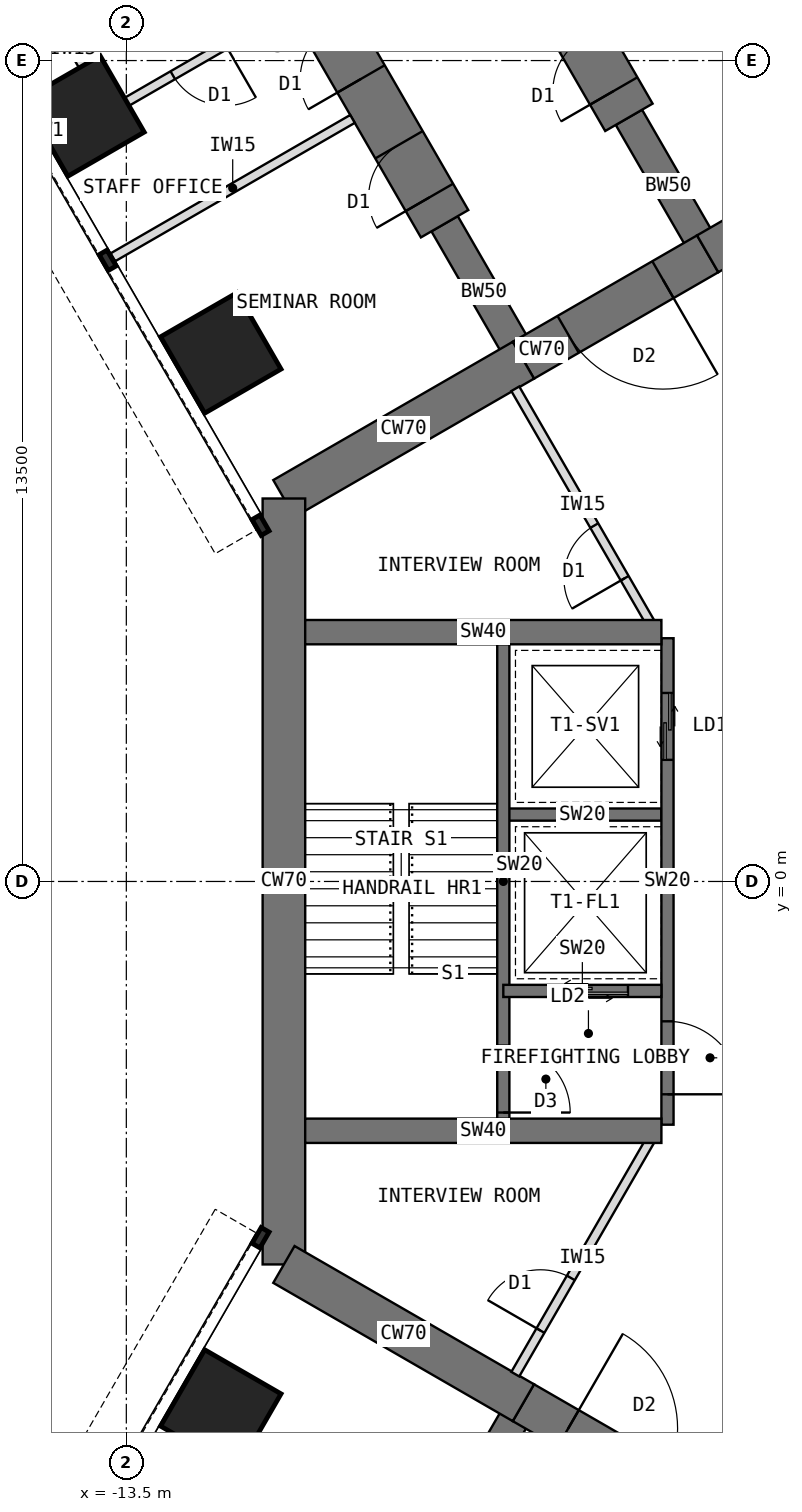
"""IFC4 building model, lengths in metres.
Left out: names, types, materials, properties, quantities, classifications, styles, units other than length and angle.
Written with IfcOpenShell. Run it as: python <this file> out.ifc"""

import sys

from ifc_helpers import new_model, si_unit, direction, frame, frame_2d, origin, origin_2d, place, context, subcontext, project, spatial, rectangle, extrude, element, fill, save


model = new_model("IFC4")
c1 = context("Model", 3, precision=1e-05, world=origin(), true_north=direction((0.0, 1.0)))
c2 = subcontext(c1, "Body", "Model", "MODEL_VIEW")
j1 = project(units=[si_unit("LENGTHUNIT", "METRE"), si_unit("PLANEANGLEUNIT", "RADIAN")], contexts=[c1])
p1 = place(None, origin())
s1 = spatial("IfcSite", under=j1, at=p1, CompositionType="ELEMENT")
p2 = place(p1, origin())
s2 = spatial("IfcBuilding", under=s1, at=p2, CompositionType="ELEMENT")
p3 = place(p2, frame((0.0, 0.0, 68.5)))
s3 = spatial("IfcBuildingStorey", under=s2, at=p3, CompositionType="ELEMENT", Elevation=68.5)
p4 = place(p3, frame((0.0, 12.596, 0.0), z_axis=(0.0, 0.0, 1.0), x_axis=(-0.866011268655, -0.500024481964, 0.0)))
e1 = element("IfcWall", 1, at=p4, inside=s3, PredefinedType="SHEAR", context=c2, shape_type="SweptSolid", body=[
    extrude(rectangle(XDim=4.548, YDim=0.7, at=frame_2d((2.274, 0.0))), origin(), (0.0, 0.0, 1.0), 4.0),
])
p5 = place(p3, frame((-3.939, 10.322, 0.0), z_axis=(0.0, 0.0, 1.0), x_axis=(-0.866019471182, -0.500010275428, 0.0)))
e2 = element("IfcWall", 2, at=p5, inside=s3, PredefinedType="SHEAR", context=c2, shape_type="SweptSolid", body=[
    extrude(rectangle(XDim=3.5, YDim=0.7, at=frame_2d((1.75, 0.0))), origin(), (0.0, 0.0, 1.0), 4.0),
])
p6 = place(p5, frame((0.85, 0.0, 0.0)))
e3 = element("IfcOpeningElement", 3, at=p6, cuts=e2, PredefinedType="OPENING", context=c2, shape_type="SweptSolid", body=[
    extrude(rectangle(XDim=1.8, YDim=2.1, at=frame_2d((0.9, 1.05))), frame((0.0, 0.36, 0.0), z_axis=(0.0, -1.0, 0.0), x_axis=(1.0, 0.0, 0.0)), (0.0, 0.0, 1.0), 0.72),
])
p7 = place(p3, frame((-6.97, 8.572, 0.0), z_axis=(0.0, 0.0, 1.0), x_axis=(-0.866034513004, -0.499984222037, 0.0)))
e4 = element("IfcWall", 4, at=p7, inside=s3, PredefinedType="SHEAR", context=c2, shape_type="SweptSolid", body=[
    extrude(rectangle(XDim=4.548, YDim=0.7, at=frame_2d((2.274, 0.0))), origin(), (0.0, 0.0, 1.0), 4.0),
])
p8 = place(p3, frame((-10.908, 6.298, 0.0), z_axis=(0.0, 0.0, 1.0), x_axis=(0.0, -1.0, 0.0)))
e5 = element("IfcWall", 5, at=p8, inside=s3, PredefinedType="SHEAR", context=c2, shape_type="SweptSolid", body=[
    extrude(rectangle(XDim=12.596, YDim=0.7, at=frame_2d((6.298, 0.0))), origin(), (0.0, 0.0, 1.0), 4.0),
])
p9 = place(p3, frame((-10.908, -6.298, 0.0), z_axis=(0.0, 0.0, 1.0), x_axis=(0.866034513004, -0.499984222037, 0.0)))
e6 = element("IfcWall", 6, at=p9, inside=s3, PredefinedType="SHEAR", context=c2, shape_type="SweptSolid", body=[
    extrude(rectangle(XDim=4.548, YDim=0.7, at=frame_2d((2.274, 0.0))), origin(), (0.0, 0.0, 1.0), 4.0),
])
p10 = place(p3, frame((-6.97, -8.572, 0.0), z_axis=(0.0, 0.0, 1.0), x_axis=(0.866019471182, -0.500010275428, 0.0)))
e7 = element("IfcWall", 7, at=p10, inside=s3, PredefinedType="SHEAR", context=c2, shape_type="SweptSolid", body=[
    extrude(rectangle(XDim=3.5, YDim=0.7, at=frame_2d((1.75, 0.0))), origin(), (0.0, 0.0, 1.0), 4.0),
])
p11 = place(p10, frame((0.85, 0.0, 0.0)))
e8 = element("IfcOpeningElement", 8, at=p11, cuts=e7, PredefinedType="OPENING", context=c2, shape_type="SweptSolid", body=[
    extrude(rectangle(XDim=1.8, YDim=2.1, at=frame_2d((0.9, 1.05))), frame((0.0, 0.36, 0.0), z_axis=(0.0, -1.0, 0.0), x_axis=(1.0, 0.0, 0.0)), (0.0, 0.0, 1.0), 0.72),
])
p12 = place(p3, frame((-6.97, 8.572, 0.0), z_axis=(0.0, 0.0, 1.0), x_axis=(-0.499988811324, 0.866031863473, 0.0)))
e9 = element("IfcWall", 9, at=p12, inside=s3, PredefinedType="SHEAR", context=c2, shape_type="SweptSolid", body=[
    extrude(rectangle(XDim=2.592, YDim=0.5, at=frame_2d((1.296, 0.0))), origin(), (0.0, 0.0, 1.0), 4.0),
])
p13 = place(p3, frame((-8.266, 10.816, 0.0), z_axis=(0.0, 0.0, 1.0), x_axis=(-0.499996231654, 0.866027579429, 0.0)))
e10 = element("IfcWall", 10, at=p13, inside=s3, PredefinedType="SHEAR", context=c2, shape_type="SweptSolid", body=[
    extrude(rectangle(XDim=13.2, YDim=0.9, at=frame_2d((6.6, 0.0))), origin(), (0.0, 0.0, 1.0), 4.0),
])
p14 = place(p13, frame((0.5, 0.0, 0.0)))
e11 = element("IfcOpeningElement", 11, at=p14, cuts=e10, PredefinedType="OPENING", context=c2, shape_type="SweptSolid", body=[
    extrude(rectangle(XDim=1.0, YDim=2.1, at=frame_2d((0.5, 1.05))), frame((0.0, 0.46, 0.0), z_axis=(0.0, -1.0, 0.0), x_axis=(1.0, 0.0, 0.0)), (0.0, 0.0, 1.0), 0.92),
])
p15 = place(p13, frame((2.75, 0.0, 0.0)))
e12 = element("IfcOpeningElement", 12, at=p15, cuts=e10, PredefinedType="OPENING", context=c2, shape_type="SweptSolid", body=[
    extrude(rectangle(XDim=1.0, YDim=2.1, at=frame_2d((0.5, 1.05))), frame((0.0, 0.46, 0.0), z_axis=(0.0, -1.0, 0.0), x_axis=(1.0, 0.0, 0.0)), (0.0, 0.0, 1.0), 0.92),
])
p16 = place(p13, frame((7.25, 0.0, 0.0)))
e13 = element("IfcOpeningElement", 13, at=p16, cuts=e10, PredefinedType="OPENING", context=c2, shape_type="SweptSolid", body=[
    extrude(rectangle(XDim=1.0, YDim=2.1, at=frame_2d((0.5, 1.05))), frame((0.0, 0.46, 0.0), z_axis=(0.0, -1.0, 0.0), x_axis=(1.0, 0.0, 0.0)), (0.0, 0.0, 1.0), 0.92),
])
p17 = place(p3, frame((-3.939, 10.322, 0.0), z_axis=(0.0, 0.0, 1.0), x_axis=(-0.499918158782, 0.866072649678, 0.0)))
e14 = element("IfcWall", 14, at=p17, inside=s3, PredefinedType="SHEAR", context=c2, shape_type="SweptSolid", body=[
    extrude(rectangle(XDim=2.592, YDim=0.5, at=frame_2d((1.296, 0.0))), origin(), (0.0, 0.0, 1.0), 4.0),
])
p18 = place(p3, frame((-5.234, 12.566, 0.0), z_axis=(0.0, 0.0, 1.0), x_axis=(-0.500010103361, 0.866019570528, 0.0)))
e15 = element("IfcWall", 15, at=p18, inside=s3, PredefinedType="SHEAR", context=c2, shape_type="SweptSolid", body=[
    extrude(rectangle(XDim=13.2, YDim=0.9, at=frame_2d((6.6, 0.0))), origin(), (0.0, 0.0, 1.0), 4.0),
])
p19 = place(p18, frame((0.5, 0.0, 0.0)))
e16 = element("IfcOpeningElement", 16, at=p19, cuts=e15, PredefinedType="OPENING", context=c2, shape_type="SweptSolid", body=[
    extrude(rectangle(XDim=1.0, YDim=2.1, at=frame_2d((0.5, 1.05))), frame((0.0, 0.46, 0.0), z_axis=(0.0, -1.0, 0.0), x_axis=(1.0, 0.0, 0.0)), (0.0, 0.0, 1.0), 0.92),
])
p20 = place(p18, frame((2.75, 0.0, 0.0)))
e17 = element("IfcOpeningElement", 17, at=p20, cuts=e15, PredefinedType="OPENING", context=c2, shape_type="SweptSolid", body=[
    extrude(rectangle(XDim=1.0, YDim=2.1, at=frame_2d((0.5, 1.05))), frame((0.0, 0.46, 0.0), z_axis=(0.0, -1.0, 0.0), x_axis=(1.0, 0.0, 0.0)), (0.0, 0.0, 1.0), 0.92),
])
p21 = place(p18, frame((7.25, 0.0, 0.0)))
e18 = element("IfcOpeningElement", 18, at=p21, cuts=e15, PredefinedType="OPENING", context=c2, shape_type="SweptSolid", body=[
    extrude(rectangle(XDim=1.0, YDim=2.1, at=frame_2d((0.5, 1.05))), frame((0.0, 0.46, 0.0), z_axis=(0.0, -1.0, 0.0), x_axis=(1.0, 0.0, 0.0)), (0.0, 0.0, 1.0), 0.92),
])
p22 = place(p3, frame((-6.97, -8.572, 0.0), z_axis=(0.0, 0.0, 1.0), x_axis=(-0.499988811324, -0.866031863473, 0.0)))
e19 = element("IfcWall", 19, at=p22, inside=s3, PredefinedType="SHEAR", context=c2, shape_type="SweptSolid", body=[
    extrude(rectangle(XDim=2.592, YDim=0.5, at=frame_2d((1.296, 0.0))), origin(), (0.0, 0.0, 1.0), 4.0),
])
for number, where, z_axis, x_axis in (
    (20, (-11.946, 8.691, 0.0), (0.0, 0.0, 1.0), (0.866, 0.5, 0.0)),
    (21, (-14.196, 12.588, 0.0), (0.0, 0.0, 1.0), (0.866, 0.5, 0.0)),
    (22, (-11.946, -8.691, 0.0), (0.0, 0.0, 1.0), (0.5, 0.866, 0.0)),
):
    element("IfcColumn", number, at=place(p3, frame(where, z_axis=z_axis, x_axis=x_axis)), inside=s3, PredefinedType="COLUMN", context=c2, shape_type="SweptSolid", body=[
        extrude(rectangle(XDim=1.45, YDim=1.45, at=origin_2d()), origin(), (0.0, 0.0, 1.0), 4.0),
    ])
p23 = place(p3, frame((-4.6, 4.0, 0.0), z_axis=(0.0, 0.0, 1.0), x_axis=(0.0, -1.0, 0.0)))
e23 = element("IfcWall", 23, at=p23, inside=s3, PredefinedType="SHEAR", context=c2, shape_type="SweptSolid", body=[
    extrude(rectangle(XDim=8.0, YDim=0.2, at=frame_2d((4.0, 0.0))), origin(), (0.0, 0.0, 1.0), 4.0),
])
p24 = place(p23, frame((6.3, 0.0, 0.0)))
e24 = element("IfcOpeningElement", 24, at=p24, cuts=e23, PredefinedType="OPENING", context=c2, shape_type="SweptSolid", body=[
    extrude(rectangle(XDim=1.2, YDim=2.1, at=frame_2d((0.6, 1.05))), frame((0.0, 0.11, 0.0), z_axis=(0.0, -1.0, 0.0), x_axis=(1.0, 0.0, 0.0)), (0.0, 0.0, 1.0), 0.22),
])
p25 = place(p23, frame((0.9, 0.0, 0.0)))
e25 = element("IfcOpeningElement", 25, at=p25, cuts=e23, PredefinedType="OPENING", context=c2, shape_type="SweptSolid", body=[
    extrude(rectangle(XDim=1.1, YDim=2.2, at=frame_2d((0.55, 1.1))), frame((0.0, 0.11, 0.0), z_axis=(0.0, -1.0, 0.0), x_axis=(1.0, 0.0, 0.0)), (0.0, 0.0, 1.0), 0.22),
])
p26 = place(p3, frame((-4.7, 1.1, 0.0), z_axis=(0.0, 0.0, 1.0), x_axis=(-1.0, 0.0, 0.0)))
e26 = element("IfcWall", 26, at=p26, inside=s3, PredefinedType="SHEAR", context=c2, shape_type="SweptSolid", body=[
    extrude(rectangle(XDim=2.6, YDim=0.2, at=frame_2d((1.3, 0.0))), origin(), (0.0, 0.0, 1.0), 4.0),
])
p27 = place(p3, frame((-4.7, -1.8, 0.0), z_axis=(0.0, 0.0, 1.0), x_axis=(-1.0, 0.0, 0.0)))
e27 = element("IfcWall", 27, at=p27, inside=s3, PredefinedType="SHEAR", context=c2, shape_type="SweptSolid", body=[
    extrude(rectangle(XDim=2.6, YDim=0.2, at=frame_2d((1.3, 0.0))), origin(), (0.0, 0.0, 1.0), 4.0),
])
p28 = place(p27, frame((0.55, 0.0, 0.0)))
e28 = element("IfcOpeningElement", 28, at=p28, cuts=e27, PredefinedType="OPENING", context=c2, shape_type="SweptSolid", body=[
    extrude(rectangle(XDim=1.3, YDim=2.2, at=frame_2d((0.65, 1.1))), frame((0.0, 0.11, 0.0), z_axis=(0.0, -1.0, 0.0), x_axis=(1.0, 0.0, 0.0)), (0.0, 0.0, 1.0), 0.22),
])
p29 = place(p3, frame((-7.3, 4.0, 0.0), z_axis=(0.0, 0.0, 1.0), x_axis=(0.0, -1.0, 0.0)))
e29 = element("IfcWall", 29, at=p29, inside=s3, PredefinedType="SHEAR", context=c2, shape_type="SweptSolid", body=[
    extrude(rectangle(XDim=8.0, YDim=0.2, at=frame_2d((4.0, 0.0))), origin(), (0.0, 0.0, 1.0), 4.0),
])
p30 = place(p29, frame((6.7, 0.0, 0.0)))
e30 = element("IfcOpeningElement", 30, at=p30, cuts=e29, PredefinedType="OPENING", context=c2, shape_type="SweptSolid", body=[
    extrude(rectangle(XDim=1.1, YDim=2.1, at=frame_2d((0.55, 1.05))), frame((0.0, 0.11, 0.0), z_axis=(0.0, -1.0, 0.0), x_axis=(1.0, 0.0, 0.0)), (0.0, 0.0, 1.0), 0.22),
])
for number, where, z_axis, x_axis in (
    (31, (-4.7, -4.1, 0.0), (0.0, 0.0, 1.0), (-1.0, 0.0, 0.0)),
    (32, (-4.7, 4.1, 0.0), (0.0, 0.0, 1.0), (-1.0, 0.0, 0.0)),
):
    element("IfcWall", number, at=place(p3, frame(where, z_axis=z_axis, x_axis=x_axis)), inside=s3, PredefinedType="SHEAR", context=c2, shape_type="SweptSolid", body=[
        extrude(rectangle(XDim=5.858, YDim=0.4, at=frame_2d((2.929, 0.0))), origin(), (0.0, 0.0, 1.0), 4.0),
    ])
p31 = place(p3, frame((-9.78, 12.54, 0.0), z_axis=(0.0, 0.0, 1.0), x_axis=(-0.866035472144, -0.499982560684, 0.0)))
e33 = element("IfcWall", 33, at=p31, inside=s3, PredefinedType="PARTITIONING", context=c2, shape_type="SweptSolid", body=[
    extrude(rectangle(XDim=4.55, YDim=0.15, at=frame_2d((2.275, 0.0))), origin(), (0.0, 0.0, 1.0), 3.8),
])
p32 = place(p3, frame((-13.775, 12.658, 0.0), z_axis=(0.0, 0.0, 1.0), x_axis=(-0.500033551112, 0.866006032174, 0.0)))
e34 = element("IfcWall", 34, at=p32, inside=s3, PredefinedType="PARTITIONING", context=c2, shape_type="SweptSolid", body=[
    extrude(rectangle(XDim=2.4, YDim=0.15, at=frame_2d((1.2, 0.0))), origin(), (0.0, 0.0, 1.0), 3.8),
])
p33 = place(p3, frame((-10.83, 14.359, 0.0), z_axis=(0.0, 0.0, 1.0), x_axis=(-0.865989465428, -0.500062241894, 0.0)))
e35 = element("IfcWall", 35, at=p33, inside=s3, PredefinedType="PARTITIONING", context=c2, shape_type="SweptSolid", body=[
    extrude(rectangle(XDim=3.4, YDim=0.15, at=frame_2d((1.7, 0.0))), origin(), (0.0, 0.0, 1.0), 3.8),
])
p34 = place(p33, frame((1.2, 0.0, 0.0)))
e36 = element("IfcOpeningElement", 36, at=p34, cuts=e35, PredefinedType="OPENING", context=c2, shape_type="SweptSolid", body=[
    extrude(rectangle(XDim=1.0, YDim=2.1, at=frame_2d((0.5, 1.05))), frame((0.0, 0.085, 0.0), z_axis=(0.0, -1.0, 0.0), x_axis=(1.0, 0.0, 0.0)), (0.0, 0.0, 1.0), 0.17),
])
p35 = place(p3, frame((-7.103, -8.103, 0.0), z_axis=(0.0, 0.0, 1.0), x_axis=(0.500007369519, 0.866021148949, 0.0)))
e37 = element("IfcWall", 37, at=p35, inside=s3, PredefinedType="PARTITIONING", context=c2, shape_type="SweptSolid", body=[
    extrude(rectangle(XDim=4.426, YDim=0.15, at=frame_2d((2.213, 0.0))), origin(), (0.0, 0.0, 1.0), 3.8),
])
p36 = place(p35, frame((0.828, 0.0, 0.0)))
e38 = element("IfcOpeningElement", 38, at=p36, cuts=e37, PredefinedType="OPENING", context=c2, shape_type="SweptSolid", body=[
    extrude(rectangle(XDim=1.0, YDim=2.1, at=frame_2d((0.5, 1.05))), frame((0.0, 0.085, 0.0), z_axis=(0.0, -1.0, 0.0), x_axis=(1.0, 0.0, 0.0)), (0.0, 0.0, 1.0), 0.17),
])
p37 = place(p3, frame((-4.89, 4.27, 0.0), z_axis=(0.0, 0.0, 1.0), x_axis=(-0.500007369519, 0.866021148949, 0.0)))
e39 = element("IfcWall", 39, at=p37, inside=s3, PredefinedType="PARTITIONING", context=c2, shape_type="SweptSolid", body=[
    extrude(rectangle(XDim=4.426, YDim=0.15, at=frame_2d((2.213, 0.0))), origin(), (0.0, 0.0, 1.0), 3.8),
])
p38 = place(p37, frame((0.828, 0.0, 0.0)))
e40 = element("IfcOpeningElement", 40, at=p38, cuts=e39, PredefinedType="OPENING", context=c2, shape_type="SweptSolid", body=[
    extrude(rectangle(XDim=1.0, YDim=2.1, at=frame_2d((0.5, 1.05))), frame((0.0, 0.085, 0.0), z_axis=(0.0, -1.0, 0.0), x_axis=(1.0, 0.0, 0.0)), (0.0, 0.0, 1.0), 0.17),
])
p39 = place(p24, origin())
e41 = element("IfcDoor", 41, at=p39, inside=s3, OperationType="SINGLE_SWING_RIGHT", PredefinedType="DOOR", context=c2, shape_type="SweptSolid", body=[
    extrude(rectangle(XDim=1.2, YDim=2.1, at=frame_2d((0.6, 1.05))), frame((0.0, 0.025, 0.0), z_axis=(0.0, -1.0, 0.0), x_axis=(1.0, 0.0, 0.0)), (0.0, 0.0, 1.0), 0.05),
])
fill(e24, e41)
p40 = place(p28, origin())
e42 = element("IfcDoor", 42, at=p40, inside=s3, OperationType="DOUBLE_DOOR_SLIDING", PredefinedType="DOOR", context=c2, shape_type="SweptSolid", body=[
    extrude(rectangle(XDim=1.3, YDim=2.2, at=frame_2d((0.65, 1.1))), frame((0.0, 0.025, 0.0), z_axis=(0.0, -1.0, 0.0), x_axis=(1.0, 0.0, 0.0)), (0.0, 0.0, 1.0), 0.05),
])
fill(e28, e42)
p41 = place(p25, origin())
e43 = element("IfcDoor", 43, at=p41, inside=s3, OperationType="DOUBLE_DOOR_SLIDING", PredefinedType="DOOR", context=c2, shape_type="SweptSolid", body=[
    extrude(rectangle(XDim=1.1, YDim=2.2, at=frame_2d((0.55, 1.1))), frame((0.0, 0.025, 0.0), z_axis=(0.0, -1.0, 0.0), x_axis=(1.0, 0.0, 0.0)), (0.0, 0.0, 1.0), 0.05),
])
fill(e25, e43)
p42 = place(p30, origin())
e44 = element("IfcDoor", 44, at=p42, inside=s3, OperationType="SINGLE_SWING_RIGHT", PredefinedType="DOOR", context=c2, shape_type="SweptSolid", body=[
    extrude(rectangle(XDim=1.1, YDim=2.1, at=frame_2d((0.55, 1.05))), frame((0.0, 0.025, 0.0), z_axis=(0.0, -1.0, 0.0), x_axis=(1.0, 0.0, 0.0)), (0.0, 0.0, 1.0), 0.05),
])
fill(e30, e44)
p43 = place(p6, origin())
e45 = element("IfcDoor", 45, at=p43, inside=s3, OperationType="DOUBLE_DOOR_DOUBLE_SWING", PredefinedType="DOOR", context=c2, shape_type="SweptSolid", body=[
    extrude(rectangle(XDim=1.72, YDim=2.06, at=frame_2d((0.9, 1.03))), frame((0.0, 0.025, 0.0), z_axis=(0.0, -1.0, 0.0), x_axis=(1.0, 0.0, 0.0)), (0.0, 0.0, 1.0), 0.05),
    extrude(rectangle(XDim=0.04, YDim=2.1, at=frame_2d((0.02, 1.05))), frame((0.0, 0.35, 0.0), z_axis=(0.0, -1.0, 0.0), x_axis=(1.0, 0.0, 0.0)), (0.0, 0.0, 1.0), 0.699),
    extrude(rectangle(XDim=0.04, YDim=2.1, at=frame_2d((1.78, 1.05))), frame((0.0, 0.35, 0.0), z_axis=(0.0, -1.0, 0.0), x_axis=(1.0, 0.0, 0.0)), (0.0, 0.0, 1.0), 0.699),
    extrude(rectangle(XDim=1.72, YDim=0.04, at=frame_2d((0.9, 2.08))), frame((0.0, 0.35, 0.0), z_axis=(0.0, -1.0, 0.0), x_axis=(1.0, 0.0, 0.0)), (0.0, 0.0, 1.0), 0.699),
])
fill(e3, e45)
p44 = place(p11, origin())
e46 = element("IfcDoor", 46, at=p44, inside=s3, OperationType="DOUBLE_DOOR_DOUBLE_SWING", PredefinedType="DOOR", context=c2, shape_type="SweptSolid", body=[
    extrude(rectangle(XDim=1.72, YDim=2.06, at=frame_2d((0.9, 1.03))), frame((0.0, 0.025, 0.0), z_axis=(0.0, -1.0, 0.0), x_axis=(1.0, 0.0, 0.0)), (0.0, 0.0, 1.0), 0.05),
    extrude(rectangle(XDim=0.04, YDim=2.1, at=frame_2d((0.02, 1.05))), frame((0.0, 0.35, 0.0), z_axis=(0.0, -1.0, 0.0), x_axis=(1.0, 0.0, 0.0)), (0.0, 0.0, 1.0), 0.699),
    extrude(rectangle(XDim=0.04, YDim=2.1, at=frame_2d((1.78, 1.05))), frame((0.0, 0.35, 0.0), z_axis=(0.0, -1.0, 0.0), x_axis=(1.0, 0.0, 0.0)), (0.0, 0.0, 1.0), 0.699),
    extrude(rectangle(XDim=1.72, YDim=0.04, at=frame_2d((0.9, 2.08))), frame((0.0, 0.35, 0.0), z_axis=(0.0, -1.0, 0.0), x_axis=(1.0, 0.0, 0.0)), (0.0, 0.0, 1.0), 0.699),
])
fill(e8, e46)
p45 = place(p34, origin())
e47 = element("IfcDoor", 47, at=p45, inside=s3, OperationType="SINGLE_SWING_LEFT", PredefinedType="DOOR", context=c2, shape_type="SweptSolid", body=[
    extrude(rectangle(XDim=1.0, YDim=2.1, at=frame_2d((0.5, 1.05))), frame((0.0, 0.025, 0.0), z_axis=(0.0, -1.0, 0.0), x_axis=(1.0, 0.0, 0.0)), (0.0, 0.0, 1.0), 0.05),
])
fill(e36, e47)
p46 = place(p36, origin())
e48 = element("IfcDoor", 48, at=p46, inside=s3, OperationType="SINGLE_SWING_LEFT", PredefinedType="DOOR", context=c2, shape_type="SweptSolid", body=[
    extrude(rectangle(XDim=1.0, YDim=2.1, at=frame_2d((0.5, 1.05))), frame((0.0, 0.025, 0.0), z_axis=(0.0, -1.0, 0.0), x_axis=(1.0, 0.0, 0.0)), (0.0, 0.0, 1.0), 0.05),
])
fill(e38, e48)
p47 = place(p38, origin())
e49 = element("IfcDoor", 49, at=p47, inside=s3, OperationType="SINGLE_SWING_LEFT", PredefinedType="DOOR", context=c2, shape_type="SweptSolid", body=[
    extrude(rectangle(XDim=1.0, YDim=2.1, at=frame_2d((0.5, 1.05))), frame((0.0, 0.025, 0.0), z_axis=(0.0, -1.0, 0.0), x_axis=(1.0, 0.0, 0.0)), (0.0, 0.0, 1.0), 0.05),
])
fill(e40, e49)
p48 = place(p14, origin())
e50 = element("IfcDoor", 50, at=p48, inside=s3, OperationType="SINGLE_SWING_LEFT", PredefinedType="DOOR", context=c2, shape_type="SweptSolid", body=[
    extrude(rectangle(XDim=0.92, YDim=2.06, at=frame_2d((0.5, 1.03))), frame((0.0, 0.025, 0.0), z_axis=(0.0, -1.0, 0.0), x_axis=(1.0, 0.0, 0.0)), (0.0, 0.0, 1.0), 0.05),
    extrude(rectangle(XDim=0.04, YDim=2.1, at=frame_2d((0.02, 1.05))), frame((0.0, 0.45, 0.0), z_axis=(0.0, -1.0, 0.0), x_axis=(1.0, 0.0, 0.0)), (0.0, 0.0, 1.0), 0.899),
    extrude(rectangle(XDim=0.04, YDim=2.1, at=frame_2d((0.98, 1.05))), frame((0.0, 0.45, 0.0), z_axis=(0.0, -1.0, 0.0), x_axis=(1.0, 0.0, 0.0)), (0.0, 0.0, 1.0), 0.899),
    extrude(rectangle(XDim=0.92, YDim=0.04, at=frame_2d((0.5, 2.08))), frame((0.0, 0.45, 0.0), z_axis=(0.0, -1.0, 0.0), x_axis=(1.0, 0.0, 0.0)), (0.0, 0.0, 1.0), 0.899),
])
fill(e11, e50)
p49 = place(p15, origin())
e51 = element("IfcDoor", 51, at=p49, inside=s3, OperationType="SINGLE_SWING_LEFT", PredefinedType="DOOR", context=c2, shape_type="SweptSolid", body=[
    extrude(rectangle(XDim=0.92, YDim=2.06, at=frame_2d((0.5, 1.03))), frame((0.0, 0.025, 0.0), z_axis=(0.0, -1.0, 0.0), x_axis=(1.0, 0.0, 0.0)), (0.0, 0.0, 1.0), 0.05),
    extrude(rectangle(XDim=0.04, YDim=2.1, at=frame_2d((0.02, 1.05))), frame((0.0, 0.45, 0.0), z_axis=(0.0, -1.0, 0.0), x_axis=(1.0, 0.0, 0.0)), (0.0, 0.0, 1.0), 0.899),
    extrude(rectangle(XDim=0.04, YDim=2.1, at=frame_2d((0.98, 1.05))), frame((0.0, 0.45, 0.0), z_axis=(0.0, -1.0, 0.0), x_axis=(1.0, 0.0, 0.0)), (0.0, 0.0, 1.0), 0.899),
    extrude(rectangle(XDim=0.92, YDim=0.04, at=frame_2d((0.5, 2.08))), frame((0.0, 0.45, 0.0), z_axis=(0.0, -1.0, 0.0), x_axis=(1.0, 0.0, 0.0)), (0.0, 0.0, 1.0), 0.899),
])
fill(e12, e51)
p50 = place(p19, origin())
e52 = element("IfcDoor", 52, at=p50, inside=s3, OperationType="SINGLE_SWING_LEFT", PredefinedType="DOOR", context=c2, shape_type="SweptSolid", body=[
    extrude(rectangle(XDim=0.92, YDim=2.06, at=frame_2d((0.5, 1.03))), frame((0.0, 0.025, 0.0), z_axis=(0.0, -1.0, 0.0), x_axis=(1.0, 0.0, 0.0)), (0.0, 0.0, 1.0), 0.05),
    extrude(rectangle(XDim=0.04, YDim=2.1, at=frame_2d((0.02, 1.05))), frame((0.0, 0.45, 0.0), z_axis=(0.0, -1.0, 0.0), x_axis=(1.0, 0.0, 0.0)), (0.0, 0.0, 1.0), 0.899),
    extrude(rectangle(XDim=0.04, YDim=2.1, at=frame_2d((0.98, 1.05))), frame((0.0, 0.45, 0.0), z_axis=(0.0, -1.0, 0.0), x_axis=(1.0, 0.0, 0.0)), (0.0, 0.0, 1.0), 0.899),
    extrude(rectangle(XDim=0.92, YDim=0.04, at=frame_2d((0.5, 2.08))), frame((0.0, 0.45, 0.0), z_axis=(0.0, -1.0, 0.0), x_axis=(1.0, 0.0, 0.0)), (0.0, 0.0, 1.0), 0.899),
])
fill(e16, e52)
save(model, sys.argv[1])
